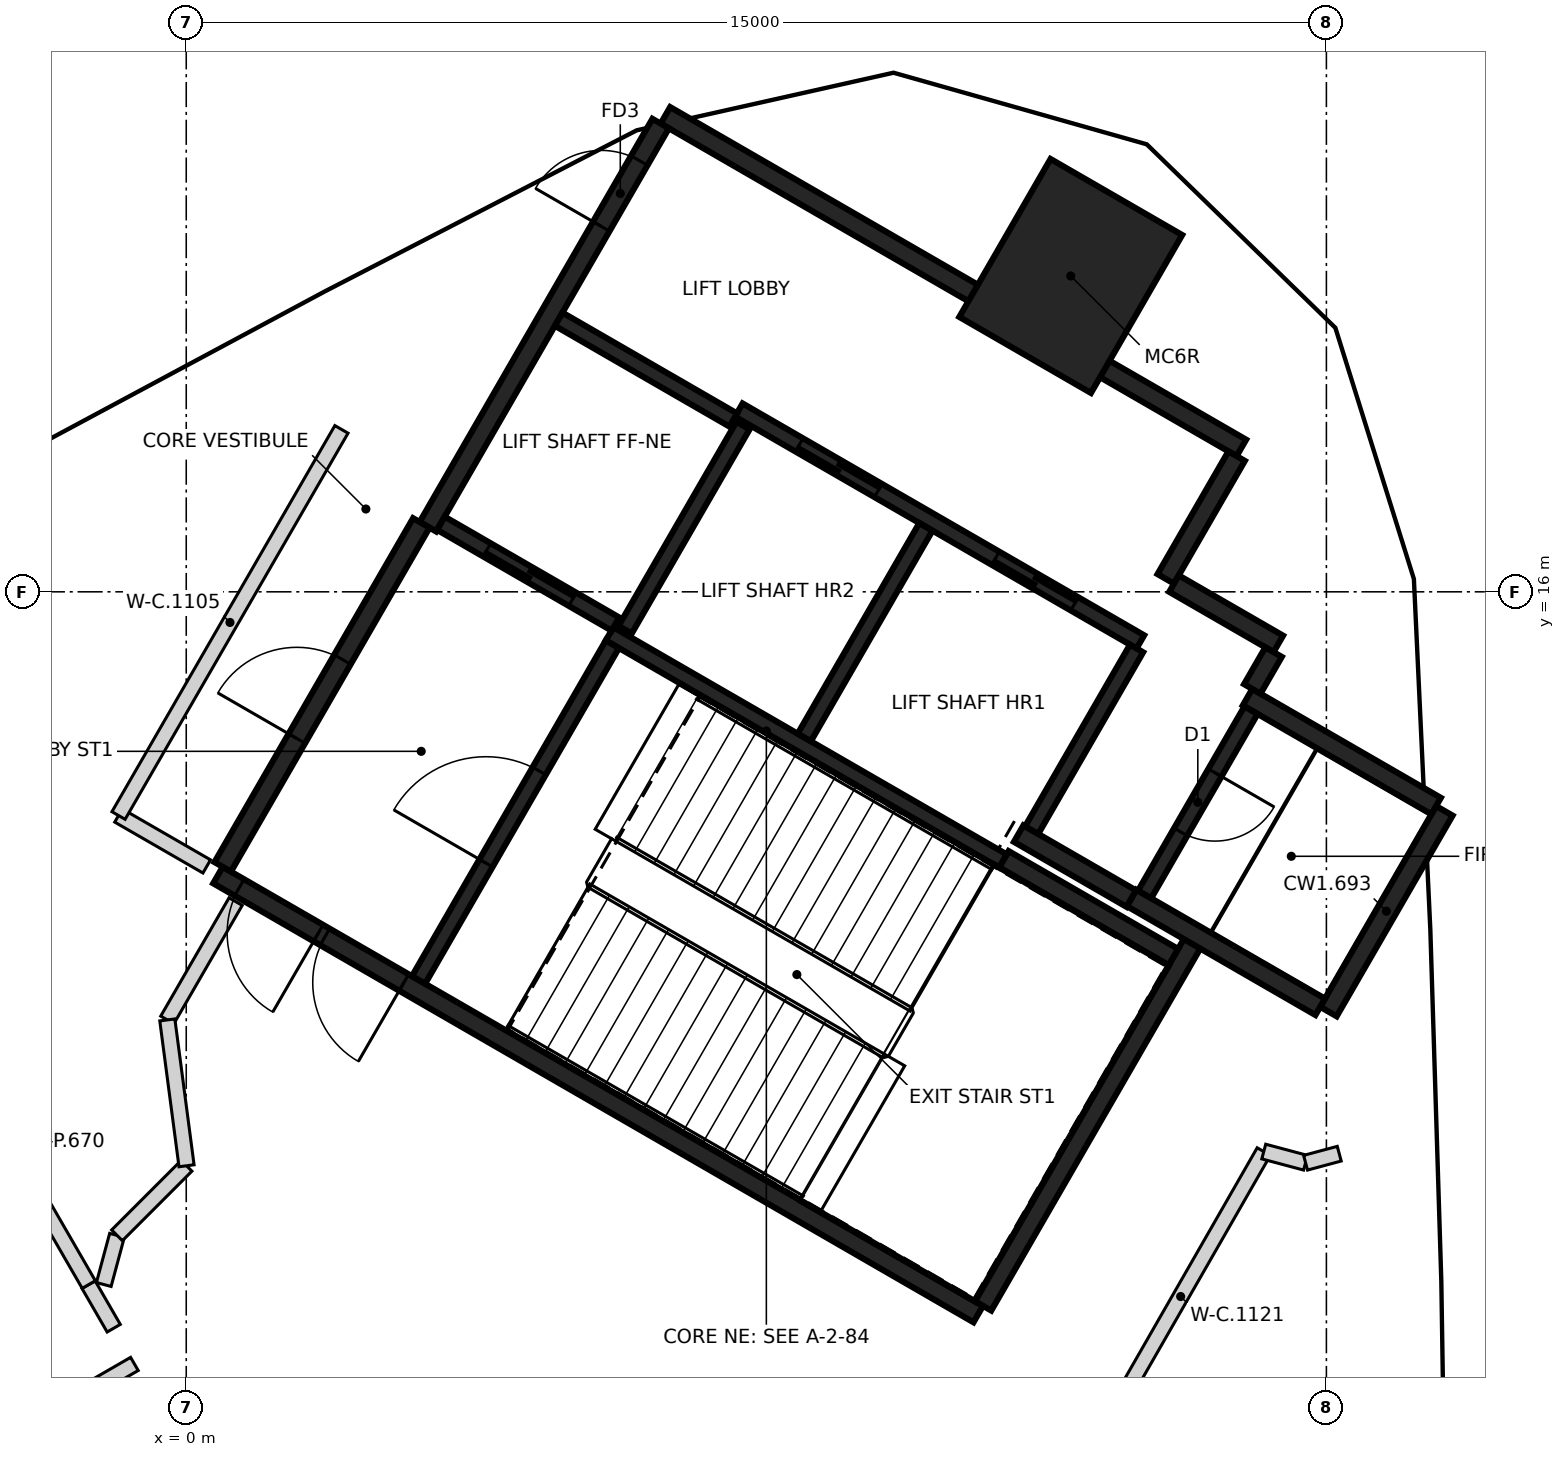
"""IFC4 building model, lengths in metres.
Left out: names, types, materials, properties, quantities, classifications, styles, units other than length and angle.
Written with IfcOpenShell. Run it as: python <this file> out.ifc"""

import sys

from ifc_helpers import new_model, si_unit, direction, frame, frame_2d, origin, origin_2d, place, context, subcontext, project, spatial, rectangle, extrude, element, fill, save


model = new_model("IFC4")
c1 = context("Model", 3, precision=1e-05, world=origin(), true_north=direction((0.0, 1.0)))
c2 = subcontext(c1, "Body", "Model", "MODEL_VIEW")
j1 = project(units=[si_unit("LENGTHUNIT", "METRE"), si_unit("PLANEANGLEUNIT", "RADIAN")], contexts=[c1])
p1 = place(None, origin())
s1 = spatial("IfcSite", under=j1, at=p1, CompositionType="ELEMENT")
p2 = place(p1, origin())
s2 = spatial("IfcBuilding", under=s1, at=p2, CompositionType="ELEMENT")
p3 = place(p2, frame((0.0, 0.0, 301.8)))
s3 = spatial("IfcBuildingStorey", under=s2, at=p3, CompositionType="ELEMENT", Elevation=301.8)
p4 = place(p3, frame((11.637, 20.155, -0.4), z_axis=(0.0, 0.0, 1.0), x_axis=(0.5, 0.866025403784, 0.0)))
e1 = element("IfcColumn", 1, at=p4, inside=s3, PredefinedType="COLUMN", context=c2, shape_type="SweptSolid", body=[
    extrude(rectangle(XDim=2.4, YDim=2.0, at=origin_2d()), origin(), (0.0, 0.0, 1.0), 4.85),
])
p5 = place(p3, frame((10.42, 6.498, 0.0), z_axis=(0.0, 0.0, 1.0), x_axis=(-0.866021906294, 0.500006057782, 0.0)))
e2 = element("IfcWall", 2, at=p5, inside=s3, PredefinedType="SHEAR", context=c2, shape_type="SweptSolid", body=[
    extrude(rectangle(XDim=11.55, YDim=0.25, at=frame_2d((5.775, 0.0))), origin(), (0.0, 0.0, 1.0), 4.45),
])
p6 = place(p5, frame((10.025, 0.0, 0.0)))
e3 = element("IfcOpeningElement", 3, at=p6, cuts=e2, PredefinedType="OPENING", context=c2, shape_type="SweptSolid", body=[
    extrude(rectangle(XDim=1.2, YDim=2.1, at=frame_2d((0.6, 1.05))), frame((0.0, 0.135, 0.0), z_axis=(0.0, -1.0, 0.0), x_axis=(1.0, 0.0, 0.0)), (0.0, 0.0, 1.0), 0.27),
])
p7 = place(p5, frame((8.725, 0.0, 0.0)))
e4 = element("IfcOpeningElement", 4, at=p7, cuts=e2, PredefinedType="OPENING", context=c2, shape_type="SweptSolid", body=[
    extrude(rectangle(XDim=1.2, YDim=2.1, at=frame_2d((0.6, 1.05))), frame((0.0, 0.135, 0.0), z_axis=(0.0, -1.0, 0.0), x_axis=(1.0, 0.0, 0.0)), (0.0, 0.0, 1.0), 0.27),
])
p8 = place(p3, frame((6.304, 22.269, 0.0), z_axis=(0.0, 0.0, 1.0), x_axis=(0.866022959057, -0.500004234368, 0.0)))
e5 = element("IfcWall", 5, at=p8, inside=s3, PredefinedType="SHEAR", context=c2, shape_type="SweptSolid", body=[
    extrude(rectangle(XDim=8.75, YDim=0.25, at=frame_2d((4.375, 0.0))), origin(), (0.0, 0.0, 1.0), 4.45),
])
p9 = place(p3, frame((3.179, 16.856, 0.0), z_axis=(0.0, 0.0, 1.0), x_axis=(0.500001955336, 0.866024274868, 0.0)))
e6 = element("IfcWall", 6, at=p9, inside=s3, PredefinedType="SHEAR", context=c2, shape_type="SweptSolid", body=[
    extrude(rectangle(XDim=6.125, YDim=0.25, at=frame_2d((3.062, 0.0))), origin(), (0.0, 0.0, 1.0), 4.45),
])
p10 = place(p9, frame((4.563, 0.0, 0.0)))
e7 = element("IfcOpeningElement", 7, at=p10, cuts=e6, PredefinedType="OPENING", context=c2, shape_type="SweptSolid", body=[
    extrude(rectangle(XDim=1.0, YDim=2.1, at=frame_2d((0.5, 1.05))), frame((0.0, 0.135, 0.0), z_axis=(0.0, -1.0, 0.0), x_axis=(1.0, 0.0, 0.0)), (0.0, 0.0, 1.0), 0.27),
])
p11 = place(p3, frame((0.48, 12.381, 0.0), z_axis=(0.0, 0.0, 1.0), x_axis=(0.49999885962, 0.866026062182, 0.0)))
e8 = element("IfcWall", 8, at=p11, inside=s3, PredefinedType="SHEAR", context=c2, shape_type="SweptSolid", body=[
    extrude(rectangle(XDim=5.225, YDim=0.25, at=frame_2d((2.612, 0.0))), origin(), (0.0, 0.0, 1.0), 4.45),
])
p12 = place(p11, frame((1.95, 0.0, 0.0)))
e9 = element("IfcOpeningElement", 9, at=p12, cuts=e8, PredefinedType="OPENING", context=c2, shape_type="SweptSolid", body=[
    extrude(rectangle(XDim=1.2, YDim=2.1, at=frame_2d((0.6, 1.05))), frame((0.0, 0.135, 0.0), z_axis=(0.0, -1.0, 0.0), x_axis=(1.0, 0.0, 0.0)), (0.0, 0.0, 1.0), 0.27),
])
p13 = place(p3, frame((13.238, 11.378, 0.0), z_axis=(0.0, 0.0, 1.0), x_axis=(-0.500008851346, -0.866020293397, 0.0)))
e10 = element("IfcWall", 10, at=p13, inside=s3, PredefinedType="SHEAR", context=c2, shape_type="SweptSolid", body=[
    extrude(rectangle(XDim=5.51, YDim=0.25, at=frame_2d((2.755, 0.0))), origin(), (0.0, 0.0, 1.0), 4.45),
])
p14 = place(p3, frame((16.552, 13.119, 0.0), z_axis=(0.0, 0.0, 1.0), x_axis=(-0.499978833458, -0.866037623948, 0.0)))
e11 = element("IfcWall", 11, at=p14, inside=s3, PredefinedType="SHEAR", context=c2, shape_type="SweptSolid", body=[
    extrude(rectangle(XDim=3.05, YDim=0.25, at=frame_2d((1.525, 0.0))), origin(), (0.0, 0.0, 1.0), 4.45),
])
p15 = place(p3, frame((14.918, 10.54, 0.0), z_axis=(0.0, 0.0, 1.0), x_axis=(-0.866063538972, 0.499933942099, 0.0)))
e12 = element("IfcWall", 12, at=p15, inside=s3, PredefinedType="SHEAR", context=c2, shape_type="SweptSolid", body=[
    extrude(rectangle(XDim=2.865, YDim=0.25, at=frame_2d((1.432, 0.0))), origin(), (0.0, 0.0, 1.0), 4.45),
])
p16 = place(p3, frame((13.963, 14.614, 0.0), z_axis=(0.0, 0.0, 1.0), x_axis=(0.866042235819, -0.499970844928, 0.0)))
e13 = element("IfcWall", 13, at=p16, inside=s3, PredefinedType="SHEAR", context=c2, shape_type="SweptSolid", body=[
    extrude(rectangle(XDim=2.865, YDim=0.25, at=frame_2d((1.432, 0.0))), origin(), (0.0, 0.0, 1.0), 4.45),
])
p17 = place(p3, frame((10.757, 12.481, 0.0), z_axis=(0.0, 0.0, 1.0), x_axis=(0.866022940537, -0.500004266446, 0.0)))
e14 = element("IfcWall", 14, at=p17, inside=s3, PredefinedType="SHEAR", context=c2, shape_type="SweptSolid", body=[
    extrude(rectangle(XDim=2.575, YDim=0.25, at=frame_2d((1.287, 0.0))), origin(), (0.0, 0.0, 1.0), 4.45),
])
p18 = place(p3, frame((13.819, 17.785, 0.0), z_axis=(0.0, 0.0, 1.0), x_axis=(-0.500039802285, -0.866002422705, 0.0)))
e15 = element("IfcWall", 15, at=p18, inside=s3, PredefinedType="SHEAR", context=c2, shape_type="SweptSolid", body=[
    extrude(rectangle(XDim=1.865, YDim=0.25, at=frame_2d((0.932, 0.0))), origin(), (0.0, 0.0, 1.0), 4.45),
])
p19 = place(p3, frame((12.433, 11.964, 0.0), z_axis=(0.0, 0.0, 1.0), x_axis=(-0.866038183914, 0.499977863513, 0.0)))
e16 = element("IfcWall", 16, at=p19, inside=s3, PredefinedType="SHEAR", context=c2, shape_type="SweptSolid", body=[
    extrude(rectangle(XDim=1.71, YDim=0.25, at=frame_2d((0.855, 0.0))), origin(), (0.0, 0.0, 1.0), 4.45),
])
p20 = place(p3, frame((12.995, 16.108, 0.0), z_axis=(0.0, 0.0, 1.0), x_axis=(0.866044474677, -0.49996696679, 0.0)))
e17 = element("IfcWall", 17, at=p20, inside=s3, PredefinedType="SHEAR", context=c2, shape_type="SweptSolid", body=[
    extrude(rectangle(XDim=1.584, YDim=0.25, at=frame_2d((0.792, 0.0))), origin(), (0.0, 0.0, 1.0), 4.45),
])
p21 = place(p3, frame((14.305, 15.207, 0.0), z_axis=(0.0, 0.0, 1.0), x_axis=(-0.499848422343, -0.866112899501, 0.0)))
e18 = element("IfcWall", 18, at=p21, inside=s3, PredefinedType="SHEAR", context=c2, shape_type="SweptSolid", body=[
    extrude(rectangle(XDim=0.559, YDim=0.25, at=frame_2d((0.28, 0.0))), origin(), (0.0, 0.0, 1.0), 4.45),
])
p22 = place(p3, frame((12.552, 15.342, 0.0), z_axis=(0.0, 0.0, 1.0), x_axis=(-0.866030299012, 0.499991521122, 0.0)))
e19 = element("IfcWall", 19, at=p22, inside=s3, PredefinedType="SHEAR", context=c2, shape_type="SweptSolid", body=[
    extrude(rectangle(XDim=6.1, YDim=0.2, at=frame_2d((3.05, 0.0))), origin(), (0.0, 0.0, 1.0), 4.45),
])
p23 = place(p22, frame((1.0, 0.0, 0.0)))
e20 = element("IfcOpeningElement", 20, at=p23, cuts=e19, PredefinedType="OPENING", context=c2, shape_type="SweptSolid", body=[
    extrude(rectangle(XDim=1.2, YDim=2.1, at=frame_2d((0.6, 1.05))), frame((0.0, 0.11, 0.0), z_axis=(0.0, -1.0, 0.0), x_axis=(1.0, 0.0, 0.0)), (0.0, 0.0, 1.0), 0.22),
])
p24 = place(p22, frame((3.982, 0.0, 0.0)))
e21 = element("IfcOpeningElement", 21, at=p24, cuts=e19, PredefinedType="OPENING", context=c2, shape_type="SweptSolid", body=[
    extrude(rectangle(XDim=1.2, YDim=2.1, at=frame_2d((0.6, 1.05))), frame((0.0, 0.11, 0.0), z_axis=(0.0, -1.0, 0.0), x_axis=(1.0, 0.0, 0.0)), (0.0, 0.0, 1.0), 0.22),
])
p25 = place(p3, frame((10.743, 12.46, 0.0), z_axis=(0.0, 0.0, 1.0), x_axis=(-0.866018848283, 0.500011354289, 0.0)))
e22 = element("IfcWall", 22, at=p25, inside=s3, PredefinedType="SHEAR", context=c2, shape_type="SweptSolid", body=[
    extrude(rectangle(XDim=5.974, YDim=0.2, at=frame_2d((2.987, 0.0))), origin(), (0.0, 0.0, 1.0), 4.45),
])
p26 = place(p3, frame((3.057, 10.895, 0.0), z_axis=(0.0, 0.0, 1.0), x_axis=(0.500027839223, 0.866009330205, 0.0)))
e23 = element("IfcWall", 23, at=p26, inside=s3, PredefinedType="SHEAR", context=c2, shape_type="SweptSolid", body=[
    extrude(rectangle(XDim=5.098, YDim=0.2, at=frame_2d((2.549, 0.0))), origin(), (0.0, 0.0, 1.0), 4.45),
])
p27 = place(p26, frame((1.774, 0.0, 0.0)))
e24 = element("IfcOpeningElement", 24, at=p27, cuts=e23, PredefinedType="OPENING", context=c2, shape_type="SweptSolid", body=[
    extrude(rectangle(XDim=1.4, YDim=2.1, at=frame_2d((0.7, 1.05))), frame((0.0, 0.11, 0.0), z_axis=(0.0, -1.0, 0.0), x_axis=(1.0, 0.0, 0.0)), (0.0, 0.0, 1.0), 0.22),
])
p28 = place(p3, frame((8.132, 14.084, 0.0), z_axis=(0.0, 0.0, 1.0), x_axis=(0.500030834389, 0.86600760081, 0.0)))
e25 = element("IfcWall", 25, at=p28, inside=s3, PredefinedType="SHEAR", context=c2, shape_type="SweptSolid", body=[
    extrude(rectangle(XDim=3.198, YDim=0.2, at=frame_2d((1.599, 0.0))), origin(), (0.0, 0.0, 1.0), 4.45),
])
p29 = place(p3, frame((14.008, 14.442, 0.0), z_axis=(0.0, 0.0, 1.0), x_axis=(-0.499986818241, -0.866033014143, 0.0)))
e26 = element("IfcWall", 26, at=p29, inside=s3, PredefinedType="SHEAR", context=c2, shape_type="SweptSolid", body=[
    extrude(rectangle(XDim=2.798, YDim=0.2, at=frame_2d((1.399, 0.0))), origin(), (0.0, 0.0, 1.0), 4.45),
])
p30 = place(p29, frame((0.949, 0.0, 0.0)))
e27 = element("IfcOpeningElement", 27, at=p30, cuts=e26, PredefinedType="OPENING", context=c2, shape_type="SweptSolid", body=[
    extrude(rectangle(XDim=0.9, YDim=2.1, at=frame_2d((0.45, 1.05))), frame((0.0, 0.11, 0.0), z_axis=(0.0, -1.0, 0.0), x_axis=(1.0, 0.0, 0.0)), (0.0, 0.0, 1.0), 0.22),
])
p31 = place(p3, frame((12.502, 15.255, 0.0), z_axis=(0.0, 0.0, 1.0), x_axis=(-0.499965018551, -0.866045599391, 0.0)))
e28 = element("IfcWall", 28, at=p31, inside=s3, PredefinedType="SHEAR", context=c2, shape_type="SweptSolid", body=[
    extrude(rectangle(XDim=2.759, YDim=0.2, at=frame_2d((1.379, 0.0))), origin(), (0.0, 0.0, 1.0), 4.45),
])
p32 = place(p3, frame((7.324, 18.187, 0.0), z_axis=(0.0, 0.0, 1.0), x_axis=(-0.499967891604, -0.866043940782, 0.0)))
e29 = element("IfcWall", 29, at=p32, inside=s3, PredefinedType="SHEAR", context=c2, shape_type="SweptSolid", body=[
    extrude(rectangle(XDim=3.1, YDim=0.2, at=frame_2d((1.55, 0.0))), origin(), (0.0, 0.0, 1.0), 4.45),
])
p33 = place(p3, frame((5.646, 15.576, 0.0), z_axis=(0.0, 0.0, 1.0), x_axis=(-0.866018407898, 0.500012117035, 0.0)))
e30 = element("IfcWall", 30, at=p33, inside=s3, PredefinedType="SHEAR", context=c2, shape_type="SweptSolid", body=[
    extrude(rectangle(XDim=2.651, YDim=0.2, at=frame_2d((1.325, 0.0))), origin(), (0.0, 0.0, 1.0), 4.45),
])
p34 = place(p33, frame((0.652, 0.0, 0.0)))
e31 = element("IfcOpeningElement", 31, at=p34, cuts=e30, PredefinedType="OPENING", context=c2, shape_type="SweptSolid", body=[
    extrude(rectangle(XDim=1.3, YDim=2.1, at=frame_2d((0.65, 1.05))), frame((0.0, 0.11, 0.0), z_axis=(0.0, -1.0, 0.0), x_axis=(1.0, 0.0, 0.0)), (0.0, 0.0, 1.0), 0.22),
])
p35 = place(p3, frame((7.196, 18.26, 0.0), z_axis=(0.0, 0.0, 1.0), x_axis=(-0.866018407898, 0.500012117035, 0.0)))
e32 = element("IfcWall", 32, at=p35, inside=s3, PredefinedType="SHEAR", context=c2, shape_type="SweptSolid", body=[
    extrude(rectangle(XDim=2.651, YDim=0.2, at=frame_2d((1.325, 0.0))), origin(), (0.0, 0.0, 1.0), 4.45),
])
p36 = place(p3, frame((-4.55, 3.608, 0.0), z_axis=(0.0, 0.0, 1.0), x_axis=(0.865943452446, 0.500141917025, 0.0)))
e33 = element("IfcWall", 33, at=p36, inside=s3, PredefinedType="PARTITIONING", context=c2, shape_type="SweptSolid", body=[
    extrude(rectangle(XDim=4.467, YDim=0.2, at=frame_2d((2.233, 0.0))), origin(), (0.0, 0.0, 1.0), 4.45),
])
p37 = place(p36, frame((1.634, 0.0, 0.0)))
e34 = element("IfcOpeningElement", 34, at=p37, cuts=e33, PredefinedType="OPENING", context=c2, shape_type="SweptSolid", body=[
    extrude(rectangle(XDim=1.2, YDim=2.1, at=frame_2d((0.6, 1.05))), frame((0.0, 0.11, 0.0), z_axis=(0.0, -1.0, 0.0), x_axis=(1.0, 0.0, 0.0)), (0.0, 0.0, 1.0), 0.22),
])
p38 = place(p3, frame((-1.285, 6.885, 0.0), z_axis=(0.0, 0.0, 1.0), x_axis=(0.499988630717, -0.866031967744, 0.0)))
e35 = element("IfcWall", 35, at=p38, inside=s3, PredefinedType="PARTITIONING", context=c2, shape_type="SweptSolid", body=[
    extrude(rectangle(XDim=0.662, YDim=0.2, at=frame_2d((0.331, 0.0))), origin(), (0.0, 0.0, 1.0), 4.45),
])
p39 = place(p3, frame((-1.085, 6.887, 0.0), z_axis=(0.0, 0.0, 1.0), x_axis=(0.259816652695, 0.965657965836, 0.0)))
e36 = element("IfcWall", 36, at=p39, inside=s3, PredefinedType="PARTITIONING", context=c2, shape_type="SweptSolid", body=[
    extrude(rectangle(XDim=0.67, YDim=0.2, at=frame_2d((0.335, 0.0))), origin(), (0.0, 0.0, 1.0), 4.45),
])
p40 = place(p3, frame((-0.911, 7.534, 0.0), z_axis=(0.0, 0.0, 1.0), x_axis=(0.707012431094, 0.707201118692, 0.0)))
e37 = element("IfcWall", 37, at=p40, inside=s3, PredefinedType="PARTITIONING", context=c2, shape_type="SweptSolid", body=[
    extrude(rectangle(XDim=1.294, YDim=0.2, at=frame_2d((0.647, 0.0))), origin(), (0.0, 0.0, 1.0), 4.45),
])
p41 = place(p3, frame((-0.891, 13.057, 0.0), z_axis=(0.0, 0.0, 1.0), x_axis=(0.866206814563, -0.499685655593, 0.0)))
e38 = element("IfcWall", 38, at=p41, inside=s3, PredefinedType="PARTITIONING", context=c2, shape_type="SweptSolid", body=[
    extrude(rectangle(XDim=1.34, YDim=0.2, at=frame_2d((0.67, 0.0))), origin(), (0.0, 0.0, 1.0), 4.45),
])
p42 = place(p3, frame((-0.891, 13.057, 0.0), z_axis=(0.0, 0.0, 1.0), x_axis=(0.499997448251, 0.866026877032, 0.0)))
e39 = element("IfcWall", 39, at=p42, inside=s3, PredefinedType="PARTITIONING", context=c2, shape_type="SweptSolid", body=[
    extrude(rectangle(XDim=5.866, YDim=0.2, at=frame_2d((2.933, 0.0))), origin(), (0.0, 0.0, 1.0), 4.45),
])
p43 = place(p3, frame((-0.249, 10.368, 0.0), z_axis=(0.0, 0.0, 1.0), x_axis=(0.499965372359, 0.866045395139, 0.0)))
e40 = element("IfcWall", 40, at=p43, inside=s3, PredefinedType="PARTITIONING", context=c2, shape_type="SweptSolid", body=[
    extrude(rectangle(XDim=1.798, YDim=0.2, at=frame_2d((0.899, 0.0))), origin(), (0.0, 0.0, 1.0), 4.45),
])
p44 = place(p3, frame((-0.249, 10.368, 0.0), z_axis=(0.0, 0.0, 1.0), x_axis=(0.13067638415, -0.991425076658, 0.0)))
e41 = element("IfcWall", 41, at=p44, inside=s3, PredefinedType="PARTITIONING", context=c2, shape_type="SweptSolid", body=[
    extrude(rectangle(XDim=1.936, YDim=0.2, at=frame_2d((0.968, 0.0))), origin(), (0.0, 0.0, 1.0), 4.45),
])
p45 = place(p3, frame((11.989, 4.822, 0.0), z_axis=(0.0, 0.0, 1.0), x_axis=(0.497442063939, 0.867497200586, 0.0)))
e42 = element("IfcWall", 42, at=p45, inside=s3, PredefinedType="PARTITIONING", context=c2, shape_type="SweptSolid", body=[
    extrude(rectangle(XDim=4.396, YDim=0.2, at=frame_2d((2.198, 0.0))), origin(), (0.0, 0.0, 1.0), 4.45),
])
p46 = place(p3, frame((14.176, 8.636, 0.0), z_axis=(0.0, 0.0, 1.0), x_axis=(0.966106711255, -0.258143027153, 0.0)))
e43 = element("IfcWall", 43, at=p46, inside=s3, PredefinedType="PARTITIONING", context=c2, shape_type="SweptSolid", body=[
    extrude(rectangle(XDim=0.569, YDim=0.2, at=frame_2d((0.285, 0.0))), origin(), (0.0, 0.0, 1.0), 4.45),
])
p47 = place(p3, frame((14.726, 8.489, 0.0), z_axis=(0.0, 0.0, 1.0), x_axis=(0.965800573938, 0.259286041625, 0.0)))
e44 = element("IfcWall", 44, at=p47, inside=s3, PredefinedType="PARTITIONING", context=c2, shape_type="SweptSolid", body=[
    extrude(rectangle(XDim=0.458, YDim=0.2, at=frame_2d((0.229, 0.0))), origin(), (0.0, 0.0, 1.0), 4.45),
])
p48 = place(p3, frame((-3.146, 10.112, 0.0), z_axis=(0.0, 0.0, 1.0), x_axis=(0.500248116606, -0.865882106197, 0.0)))
e45 = element("IfcWall", 45, at=p48, inside=s3, PredefinedType="PARTITIONING", context=c2, shape_type="SweptSolid", body=[
    extrude(rectangle(XDim=3.725, YDim=0.2, at=frame_2d((1.863, 0.0))), origin(), (0.0, 0.0, 1.0), 4.45),
])
p49 = place(p34, origin())
e46 = element("IfcDoor", 46, at=p49, inside=s3, OperationType="SLIDING_TO_RIGHT", PredefinedType="DOOR", context=c2, shape_type="SweptSolid", body=[
    extrude(rectangle(XDim=1.3, YDim=2.1, at=frame_2d((0.65, 1.05))), frame((0.0, 0.025, 0.0), z_axis=(0.0, -1.0, 0.0), x_axis=(1.0, 0.0, 0.0)), (0.0, 0.0, 1.0), 0.05),
])
fill(e31, e46)
p50 = place(p23, origin())
e47 = element("IfcDoor", 47, at=p50, inside=s3, OperationType="DOUBLE_DOOR_SLIDING", PredefinedType="DOOR", context=c2, shape_type="SweptSolid", body=[
    extrude(rectangle(XDim=1.2, YDim=2.1, at=frame_2d((0.6, 1.05))), frame((0.0, 0.025, 0.0), z_axis=(0.0, -1.0, 0.0), x_axis=(1.0, 0.0, 0.0)), (0.0, 0.0, 1.0), 0.05),
])
fill(e20, e47)
p51 = place(p24, origin())
e48 = element("IfcDoor", 48, at=p51, inside=s3, OperationType="DOUBLE_DOOR_SLIDING", PredefinedType="DOOR", context=c2, shape_type="SweptSolid", body=[
    extrude(rectangle(XDim=1.2, YDim=2.1, at=frame_2d((0.6, 1.05))), frame((0.0, 0.025, 0.0), z_axis=(0.0, -1.0, 0.0), x_axis=(1.0, 0.0, 0.0)), (0.0, 0.0, 1.0), 0.05),
])
fill(e21, e48)
p52 = place(p10, origin())
e49 = element("IfcDoor", 49, at=p52, inside=s3, OperationType="SINGLE_SWING_LEFT", PredefinedType="DOOR", context=c2, shape_type="SweptSolid", body=[
    extrude(rectangle(XDim=1.0, YDim=2.1, at=frame_2d((0.5, 1.05))), frame((0.0, 0.025, 0.0), z_axis=(0.0, -1.0, 0.0), x_axis=(1.0, 0.0, 0.0)), (0.0, 0.0, 1.0), 0.05),
])
fill(e7, e49)
p53 = place(p6, origin())
e50 = element("IfcDoor", 50, at=p53, inside=s3, OperationType="SINGLE_SWING_LEFT", PredefinedType="DOOR", context=c2, shape_type="SweptSolid", body=[
    extrude(rectangle(XDim=1.2, YDim=2.1, at=frame_2d((0.6, 1.05))), frame((0.0, 0.025, 0.0), z_axis=(0.0, -1.0, 0.0), x_axis=(1.0, 0.0, 0.0)), (0.0, 0.0, 1.0), 0.05),
])
fill(e3, e50)
p54 = place(p7, origin())
e51 = element("IfcDoor", 51, at=p54, inside=s3, OperationType="SINGLE_SWING_RIGHT", PredefinedType="DOOR", context=c2, shape_type="SweptSolid", body=[
    extrude(rectangle(XDim=1.2, YDim=2.1, at=frame_2d((0.6, 1.05))), frame((0.0, 0.025, 0.0), z_axis=(0.0, -1.0, 0.0), x_axis=(1.0, 0.0, 0.0)), (0.0, 0.0, 1.0), 0.05),
])
fill(e4, e51)
p55 = place(p27, origin())
e52 = element("IfcDoor", 52, at=p55, inside=s3, OperationType="SINGLE_SWING_RIGHT", PredefinedType="DOOR", context=c2, shape_type="SweptSolid", body=[
    extrude(rectangle(XDim=1.4, YDim=2.1, at=frame_2d((0.7, 1.05))), frame((0.0, 0.025, 0.0), z_axis=(0.0, -1.0, 0.0), x_axis=(1.0, 0.0, 0.0)), (0.0, 0.0, 1.0), 0.05),
])
fill(e24, e52)
p56 = place(p30, origin())
e53 = element("IfcDoor", 53, at=p56, inside=s3, OperationType="SINGLE_SWING_LEFT", PredefinedType="DOOR", context=c2, shape_type="SweptSolid", body=[
    extrude(rectangle(XDim=0.9, YDim=2.1, at=frame_2d((0.45, 1.05))), frame((0.0, 0.025, 0.0), z_axis=(0.0, -1.0, 0.0), x_axis=(1.0, 0.0, 0.0)), (0.0, 0.0, 1.0), 0.05),
])
fill(e27, e53)
p57 = place(p12, origin())
e54 = element("IfcDoor", 54, at=p57, inside=s3, OperationType="SINGLE_SWING_LEFT", PredefinedType="DOOR", context=c2, shape_type="SweptSolid", body=[
    extrude(rectangle(XDim=1.2, YDim=2.1, at=frame_2d((0.6, 1.05))), frame((0.0, 0.025, 0.0), z_axis=(0.0, -1.0, 0.0), x_axis=(1.0, 0.0, 0.0)), (0.0, 0.0, 1.0), 0.05),
])
fill(e9, e54)
save(model, sys.argv[1])
